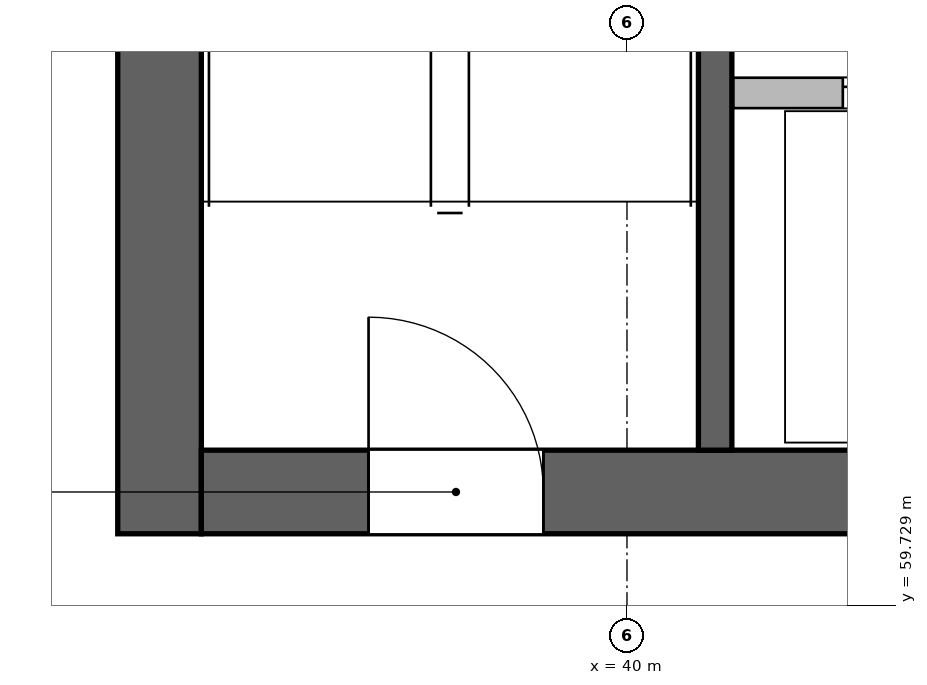
"""IFC4 building model, lengths in metres.
Left out: names, types, materials, properties, quantities, classifications, styles, units other than length and angle.
Written with IfcOpenShell. Run it as: python <this file> out.ifc"""

import sys

from ifc_helpers import new_model, si_unit, direction, frame, frame_2d, origin, place, context, subcontext, project, spatial, rectangle, extrude, source, transform, mapped, element, fill, save


model = new_model("IFC4")
c1 = context("Model", 3, precision=1e-05, world=origin(), true_north=direction((0.0, 1.0)))
c2 = subcontext(c1, "Body", "Model", "MODEL_VIEW")
j1 = project(units=[si_unit("LENGTHUNIT", "METRE"), si_unit("PLANEANGLEUNIT", "RADIAN")], contexts=[c1])
p1 = place(None, origin())
s1 = spatial("IfcSite", under=j1, at=p1, CompositionType="ELEMENT")
p2 = place(p1, origin())
s2 = spatial("IfcBuilding", under=s1, at=p2, CompositionType="ELEMENT")
p3 = place(p2, frame((0.0, 0.0, 6.0)))
s3 = spatial("IfcBuildingStorey", under=s2, at=p3, CompositionType="ELEMENT", Elevation=6.0)
m1 = source(origin(), c2, "Body", "SweptSolid", [
    extrude(rectangle(XDim=12.0, YDim=0.55, at=frame_2d((6.0, 0.0))), origin(), (0.0, 0.0, 1.0), 6.0),
])
p4 = place(p3, frame((36.925, 60.2, 0.0), z_axis=(0.0, 0.0, 1.0), x_axis=(0.0, 1.0, 0.0)))
e1 = element("IfcWall", 1, at=p4, inside=s3, PredefinedType="SHEAR", context=c2, shape_type="MappedRepresentation", body=[
    mapped(m1, transform((0.0, 0.0, 0.0), scale=1.0)),
])
m2 = source(origin(), c2, "Body", "SweptSolid", [
    extrude(rectangle(XDim=21.6, YDim=0.55, at=frame_2d((10.8, 0.0))), origin(), (0.0, 0.0, 1.0), 6.0),
])
p5 = place(p3, frame((37.2, 60.475, 0.0), z_axis=(0.0, 0.0, 1.0), x_axis=(1.0, 0.0, 0.0)))
e2 = element("IfcWall", 2, at=p5, inside=s3, PredefinedType="SHEAR", context=c2, shape_type="MappedRepresentation", body=[
    mapped(m2, transform((0.0, 0.0, 0.0), scale=1.0)),
])
p6 = place(p5, frame((1.1, 0.0, 0.0)))
e3 = element("IfcOpeningElement", 3, at=p6, cuts=e2, PredefinedType="OPENING", context=c2, shape_type="SweptSolid", body=[
    extrude(rectangle(XDim=1.15, YDim=2.15, at=frame_2d((0.575, 1.075))), frame((0.0, 0.285, 0.0), z_axis=(0.0, -1.0, 0.0), x_axis=(1.0, 0.0, 0.0)), (0.0, 0.0, 1.0), 0.57),
])
p7 = place(p5, frame((19.5, 0.0, 0.0)))
e4 = element("IfcOpeningElement", 4, at=p7, cuts=e2, PredefinedType="OPENING", context=c2, shape_type="SweptSolid", body=[
    extrude(rectangle(XDim=0.9, YDim=2.1, at=frame_2d((0.45, 1.05))), frame((0.0, 0.285, 0.0), z_axis=(0.0, -1.0, 0.0), x_axis=(1.0, 0.0, 0.0)), (0.0, 0.0, 1.0), 0.57),
])
p8 = place(p5, frame((12.02, 0.0, 0.0)))
e5 = element("IfcOpeningElement", 5, at=p8, cuts=e2, PredefinedType="OPENING", context=c2, shape_type="SweptSolid", body=[
    extrude(rectangle(XDim=1.6, YDim=2.15, at=frame_2d((0.8, 1.075))), frame((0.0, 0.285, 0.0), z_axis=(0.0, -1.0, 0.0), x_axis=(1.0, 0.0, 0.0)), (0.0, 0.0, 1.0), 0.57),
])
m3 = source(origin(), c2, "Body", "SweptSolid", [
    extrude(rectangle(XDim=10.9, YDim=0.22, at=frame_2d((5.45, 0.0))), origin(), (0.0, 0.0, 1.0), 6.0),
])
p9 = place(p3, frame((40.58, 60.75, 0.0), z_axis=(0.0, 0.0, 1.0), x_axis=(0.0, 1.0, 0.0)))
e6 = element("IfcWall", 6, at=p9, inside=s3, PredefinedType="SHEAR", context=c2, shape_type="MappedRepresentation", body=[
    mapped(m3, transform((0.0, 0.0, 0.0), scale=1.0)),
])
m4 = source(origin(), c2, "Body", "SweptSolid", [
    extrude(rectangle(XDim=8.02, YDim=0.2, at=frame_2d((4.01, 0.0))), origin(), (0.0, 0.0, 1.0), 5.7),
])
p10 = place(p3, frame((40.7, 63.1, 0.0), z_axis=(0.0, 0.0, 1.0), x_axis=(1.0, 0.0, 0.0)))
e7 = element("IfcWall", 7, at=p10, inside=s3, PredefinedType="SOLIDWALL", context=c2, shape_type="MappedRepresentation", body=[
    mapped(m4, transform((0.0, 0.0, 0.0), scale=1.0)),
])
p11 = place(p10, frame((0.72, 0.0, 0.0)))
e8 = element("IfcOpeningElement", 8, at=p11, cuts=e7, PredefinedType="OPENING", context=c2, shape_type="SweptSolid", body=[
    extrude(rectangle(XDim=1.0, YDim=2.15, at=frame_2d((0.5, 1.075))), frame((0.0, 0.11, 0.0), z_axis=(0.0, -1.0, 0.0), x_axis=(1.0, 0.0, 0.0)), (0.0, 0.0, 1.0), 0.22),
])
p12 = place(p10, frame((2.62, 0.0, 0.0)))
e9 = element("IfcOpeningElement", 9, at=p12, cuts=e7, PredefinedType="OPENING", context=c2, shape_type="SweptSolid", body=[
    extrude(rectangle(XDim=1.0, YDim=2.15, at=frame_2d((0.5, 1.075))), frame((0.0, 0.11, 0.0), z_axis=(0.0, -1.0, 0.0), x_axis=(1.0, 0.0, 0.0)), (0.0, 0.0, 1.0), 0.22),
])
p13 = place(p10, frame((4.55, 0.0, 0.0)))
e10 = element("IfcOpeningElement", 10, at=p13, cuts=e7, PredefinedType="OPENING", context=c2, shape_type="SweptSolid", body=[
    extrude(rectangle(XDim=1.0, YDim=2.15, at=frame_2d((0.5, 1.075))), frame((0.0, 0.11, 0.0), z_axis=(0.0, -1.0, 0.0), x_axis=(1.0, 0.0, 0.0)), (0.0, 0.0, 1.0), 0.22),
])
p14 = place(p10, frame((6.55, 0.0, 0.0)))
e11 = element("IfcOpeningElement", 11, at=p14, cuts=e7, PredefinedType="OPENING", context=c2, shape_type="SweptSolid", body=[
    extrude(rectangle(XDim=1.0, YDim=2.15, at=frame_2d((0.5, 1.075))), frame((0.0, 0.11, 0.0), z_axis=(0.0, -1.0, 0.0), x_axis=(1.0, 0.0, 0.0)), (0.0, 0.0, 1.0), 0.22),
])
m5 = source(origin(), c2, "Body", "SweptSolid", [
    extrude(rectangle(XDim=1.15, YDim=2.15, at=frame_2d((0.575, 1.075))), frame((0.0, 0.025, 0.0), z_axis=(0.0, -1.0, 0.0), x_axis=(1.0, 0.0, 0.0)), (0.0, 0.0, 1.0), 0.05),
])
p15 = place(p6, origin())
e12 = element("IfcDoor", 12, at=p15, inside=s3, OperationType="SINGLE_SWING_LEFT", PredefinedType="DOOR", context=c2, shape_type="MappedRepresentation", body=[
    mapped(m5, transform((0.0, 0.0, 0.0), scale=1.0)),
])
fill(e3, e12)
m6 = source(origin(), c2, "Body", "SweptSolid", [
    extrude(rectangle(XDim=1.0, YDim=2.15, at=frame_2d((0.5, 1.075))), frame((0.0, 0.025, 0.0), z_axis=(0.0, -1.0, 0.0), x_axis=(1.0, 0.0, 0.0)), (0.0, 0.0, 1.0), 0.05),
])
p16 = place(p11, origin())
e13 = element("IfcDoor", 13, at=p16, inside=s3, OperationType="DOUBLE_DOOR_SLIDING", PredefinedType="DOOR", context=c2, shape_type="MappedRepresentation", body=[
    mapped(m6, transform((0.0, 0.0, 0.0), scale=1.0)),
])
fill(e8, e13)
save(model, sys.argv[1])
